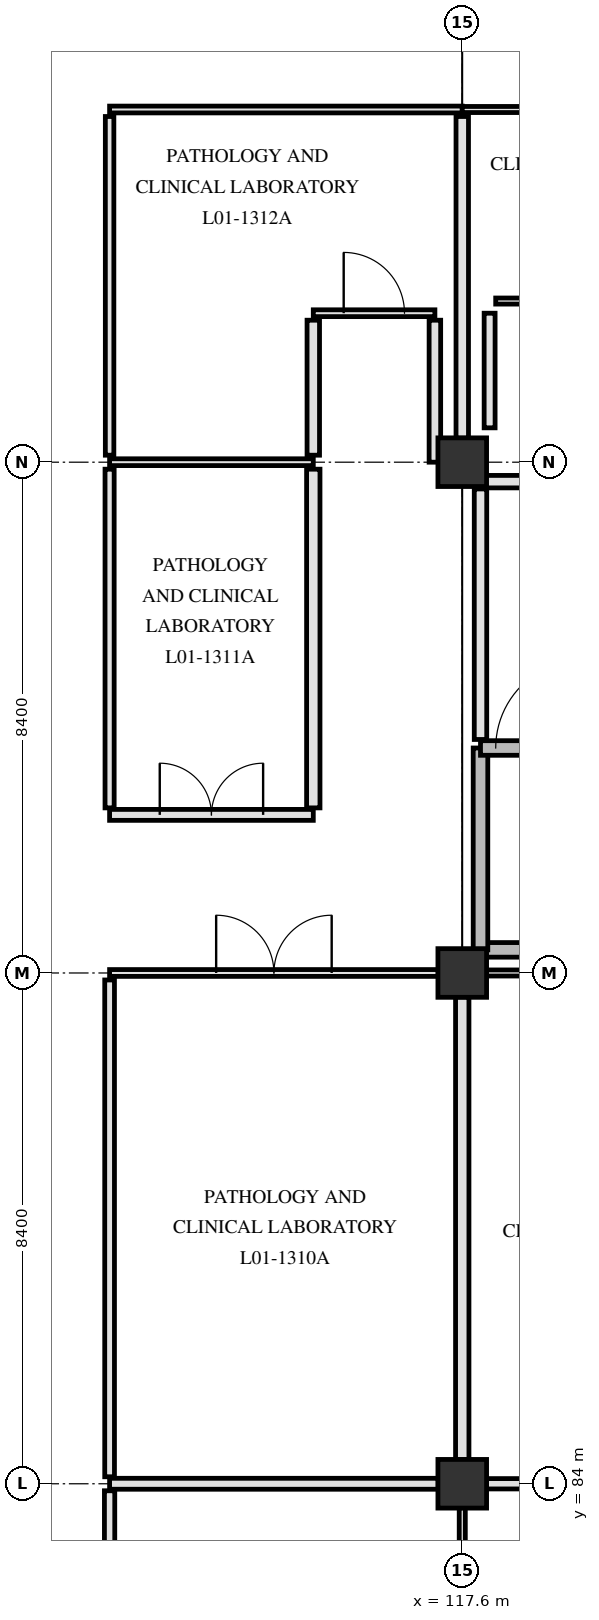
"""IFC4 building model, lengths in metres.
Left out: names, types, materials, properties, quantities, classifications, styles, units other than length and angle.
Written with IfcOpenShell. Run it as: python <this file> out.ifc"""

import sys

from ifc_helpers import new_model, si_unit, direction, frame, frame_2d, origin, origin_2d, place, context, subcontext, project, spatial, rectangle, extrude, element, fill, save


model = new_model("IFC4")
c1 = context("Model", 3, precision=1e-05, world=origin(), true_north=direction((0.0, 1.0)))
c2 = subcontext(c1, "Body", "Model", "MODEL_VIEW")
j1 = project(units=[si_unit("LENGTHUNIT", "METRE"), si_unit("PLANEANGLEUNIT", "RADIAN")], contexts=[c1])
p1 = place(None, origin())
s1 = spatial("IfcSite", under=j1, at=p1, CompositionType="ELEMENT")
p2 = place(p1, origin())
s2 = spatial("IfcBuilding", under=s1, at=p2, CompositionType="ELEMENT")
p3 = place(p2, frame((0.0, 0.0, 4.8)))
s3 = spatial("IfcBuildingStorey", under=s2, at=p3, CompositionType="ELEMENT", Elevation=4.8)
for number, where, z_axis, x_axis in (
    (1, (117.6, 84.0, 0.0), (0.0, 0.0, 1.0), (1.0, 0.0, 0.0)),
    (2, (117.6, 92.4, 0.0), (0.0, 0.0, 1.0), (1.0, 0.0, 0.0)),
    (3, (117.6, 100.8, 0.0), (0.0, 0.0, 1.0), (1.0, 0.0, 0.0)),
):
    element("IfcColumn", number, at=place(p3, frame(where, z_axis=z_axis, x_axis=x_axis)), inside=s3, PredefinedType="COLUMN", context=c2, shape_type="SweptSolid", body=[
        extrude(rectangle(XDim=0.8, YDim=0.8, at=origin_2d()), origin(), (0.0, 0.0, 1.0), 4.5),
    ])
p4 = place(p3, frame((117.9, 92.78, 0.0), z_axis=(0.0, 0.0, 1.0), x_axis=(1.0, 0.0, 0.0)))
e4 = element("IfcWall", 4, at=p4, inside=s3, PredefinedType="SHEAR", context=c2, shape_type="SweptSolid", body=[
    extrude(rectangle(XDim=7.82, YDim=0.24, at=frame_2d((3.91, 0.0))), origin(), (0.0, 0.0, 1.0), 4.15),
])
p5 = place(p3, frame((117.9, 92.78, 0.0), z_axis=(0.0, 0.0, 1.0), x_axis=(0.0, 1.0, 0.0)))
e5 = element("IfcWall", 5, at=p5, inside=s3, PredefinedType="SHEAR", context=c2, shape_type="SweptSolid", body=[
    extrude(rectangle(XDim=3.32, YDim=0.24, at=frame_2d((1.66, 0.0))), origin(), (0.0, 0.0, 1.0), 4.15),
])
p6 = place(p3, frame((117.9, 96.1, 0.0), z_axis=(0.0, 0.0, 1.0), x_axis=(1.0, 0.0, 0.0)))
e6 = element("IfcWall", 6, at=p6, inside=s3, PredefinedType="SHEAR", context=c2, shape_type="SweptSolid", body=[
    extrude(rectangle(XDim=7.82, YDim=0.24, at=frame_2d((3.91, 0.0))), origin(), (0.0, 0.0, 1.0), 4.15),
])
p7 = place(p6, frame((0.25, 0.0, 0.0)))
e7 = element("IfcOpeningElement", 7, at=p7, cuts=e6, PredefinedType="OPENING", context=c2, shape_type="SweptSolid", body=[
    extrude(rectangle(XDim=1.45, YDim=2.2, at=frame_2d((0.725, 1.1))), frame((0.0, 0.13, 0.0), z_axis=(0.0, -1.0, 0.0), x_axis=(1.0, 0.0, 0.0)), (0.0, 0.0, 1.0), 0.26),
])
p8 = place(p3, frame((117.9, 96.24, 0.0), z_axis=(0.0, 0.0, 1.0), x_axis=(0.0, 1.0, 0.0)))
e8 = element("IfcWall", 8, at=p8, inside=s3, PredefinedType="PARTITIONING", context=c2, shape_type="SweptSolid", body=[
    extrude(rectangle(XDim=4.12, YDim=0.205, at=frame_2d((2.06, 0.0))), origin(), (0.0, 0.0, 1.0), 3.59),
])
p9 = place(p3, frame((117.9, 100.48, 0.0), z_axis=(0.0, 0.0, 1.0), x_axis=(1.0, 0.0, 0.0)))
e9 = element("IfcWall", 9, at=p9, inside=s3, PredefinedType="PARTITIONING", context=c2, shape_type="SweptSolid", body=[
    extrude(rectangle(XDim=4.18, YDim=0.205, at=frame_2d((2.09, 0.0))), origin(), (0.0, 0.0, 1.0), 3.54),
])
p10 = place(p9, frame((1.29, 0.0, 0.0)))
e10 = element("IfcOpeningElement", 10, at=p10, cuts=e9, PredefinedType="OPENING", context=c2, shape_type="SweptSolid", body=[
    extrude(rectangle(XDim=1.6, YDim=2.25, at=frame_2d((0.8, 1.125))), frame((0.0, 0.113, 0.0), z_axis=(0.0, -1.0, 0.0), x_axis=(1.0, 0.0, 0.0)), (0.0, 0.0, 1.0), 0.225),
])
p11 = place(p3, frame((111.8, 84.0, 0.0), z_axis=(0.0, 0.0, 1.0), x_axis=(1.0, 0.0, 0.0)))
e11 = element("IfcWall", 11, at=p11, inside=s3, PredefinedType="PARTITIONING", context=c2, shape_type="SweptSolid", body=[
    extrude(rectangle(XDim=5.405, YDim=0.18, at=frame_2d((2.703, 0.0))), origin(), (0.0, 0.0, 1.0), 3.54),
])
p12 = place(p3, frame((117.995, 84.0, 0.0), z_axis=(0.0, 0.0, 1.0), x_axis=(1.0, 0.0, 0.0)))
e12 = element("IfcWall", 12, at=p12, inside=s3, PredefinedType="PARTITIONING", context=c2, shape_type="SweptSolid", body=[
    extrude(rectangle(XDim=5.555, YDim=0.17, at=frame_2d((2.777, 0.0))), origin(), (0.0, 0.0, 1.0), 3.54),
])
p13 = place(p3, frame((111.8, 92.4, 0.0), z_axis=(0.0, 0.0, 1.0), x_axis=(1.0, 0.0, 0.0)))
e13 = element("IfcWall", 13, at=p13, inside=s3, PredefinedType="PARTITIONING", context=c2, shape_type="SweptSolid", body=[
    extrude(rectangle(XDim=5.405, YDim=0.112, at=frame_2d((2.703, 0.0))), origin(), (0.0, 0.0, 1.0), 3.54),
])
p14 = place(p13, frame((1.752, 0.0, 0.0)))
e14 = element("IfcOpeningElement", 14, at=p14, cuts=e13, PredefinedType="OPENING", context=c2, shape_type="SweptSolid", body=[
    extrude(rectangle(XDim=1.9, YDim=2.3, at=frame_2d((0.95, 1.15))), frame((0.0, 0.066, 0.0), z_axis=(0.0, -1.0, 0.0), x_axis=(1.0, 0.0, 0.0)), (0.0, 0.0, 1.0), 0.132),
])
p15 = place(p3, frame((117.995, 92.4, 0.0), z_axis=(0.0, 0.0, 1.0), x_axis=(1.0, 0.0, 0.0)))
e15 = element("IfcWall", 15, at=p15, inside=s3, PredefinedType="PARTITIONING", context=c2, shape_type="SweptSolid", body=[
    extrude(rectangle(XDim=7.61, YDim=0.1, at=frame_2d((3.805, 0.0))), origin(), (0.0, 0.0, 1.0), 3.54),
])
p16 = place(p3, frame((111.8, 95.0, 0.0), z_axis=(0.0, 0.0, 1.0), x_axis=(1.0, 0.0, 0.0)))
e16 = element("IfcWall", 16, at=p16, inside=s3, PredefinedType="PARTITIONING", context=c2, shape_type="SweptSolid", body=[
    extrude(rectangle(XDim=3.35, YDim=0.18, at=frame_2d((1.675, 0.0))), origin(), (0.0, 0.0, 1.0), 4.14),
])
p17 = place(p16, frame((0.825, 0.0, 0.0)))
e17 = element("IfcOpeningElement", 17, at=p17, cuts=e16, PredefinedType="OPENING", context=c2, shape_type="SweptSolid", body=[
    extrude(rectangle(XDim=1.7, YDim=2.25, at=frame_2d((0.85, 1.125))), frame((0.0, 0.1, 0.0), z_axis=(0.0, -1.0, 0.0), x_axis=(1.0, 0.0, 0.0)), (0.0, 0.0, 1.0), 0.2),
])
p18 = place(p3, frame((111.8, 100.8, 0.0), z_axis=(0.0, 0.0, 1.0), x_axis=(1.0, 0.0, 0.0)))
e18 = element("IfcWall", 18, at=p18, inside=s3, PredefinedType="PARTITIONING", context=c2, shape_type="SweptSolid", body=[
    extrude(rectangle(XDim=3.35, YDim=0.112, at=frame_2d((1.675, 0.0))), origin(), (0.0, 0.0, 1.0), 3.54),
])
p19 = place(p3, frame((115.15, 103.25, 0.0), z_axis=(0.0, 0.0, 1.0), x_axis=(1.0, 0.0, 0.0)))
e19 = element("IfcWall", 19, at=p19, inside=s3, PredefinedType="PARTITIONING", context=c2, shape_type="SweptSolid", body=[
    extrude(rectangle(XDim=2.0, YDim=0.112, at=frame_2d((1.0, 0.0))), origin(), (0.0, 0.0, 1.0), 4.14),
])
p20 = place(p19, frame((0.5, 0.0, 0.0)))
e20 = element("IfcOpeningElement", 20, at=p20, cuts=e19, PredefinedType="OPENING", context=c2, shape_type="SweptSolid", body=[
    extrude(rectangle(XDim=1.0, YDim=2.15, at=frame_2d((0.5, 1.075))), frame((0.0, 0.066, 0.0), z_axis=(0.0, -1.0, 0.0), x_axis=(1.0, 0.0, 0.0)), (0.0, 0.0, 1.0), 0.132),
])
p21 = place(p3, frame((118.15, 103.45, 0.0), z_axis=(0.0, 0.0, 1.0), x_axis=(1.0, 0.0, 0.0)))
e21 = element("IfcWall", 21, at=p21, inside=s3, PredefinedType="PARTITIONING", context=c2, shape_type="SweptSolid", body=[
    extrude(rectangle(XDim=7.85, YDim=0.1, at=frame_2d((3.925, 0.0))), origin(), (0.0, 0.0, 1.0), 3.59),
])
p22 = place(p21, frame((3.265, 0.0, 0.0)))
e22 = element("IfcOpeningElement", 22, at=p22, cuts=e21, PredefinedType="OPENING", context=c2, shape_type="SweptSolid", body=[
    extrude(rectangle(XDim=1.32, YDim=2.18, at=frame_2d((0.66, 1.09))), frame((0.0, 0.06, 0.0), z_axis=(0.0, -1.0, 0.0), x_axis=(1.0, 0.0, 0.0)), (0.0, 0.0, 1.0), 0.12),
])
p23 = place(p3, frame((111.8, 106.6, 0.0), z_axis=(0.0, 0.0, 1.0), x_axis=(1.0, 0.0, 0.0)))
e23 = element("IfcWall", 23, at=p23, inside=s3, PredefinedType="PARTITIONING", context=c2, shape_type="SweptSolid", body=[
    extrude(rectangle(XDim=5.8, YDim=0.112, at=frame_2d((2.9, 0.0))), origin(), (0.0, 0.0, 1.0), 3.59),
])
p24 = place(p3, frame((117.6, 106.6, 0.0), z_axis=(0.0, 0.0, 1.0), x_axis=(1.0, 0.0, 0.0)))
e24 = element("IfcWall", 24, at=p24, inside=s3, PredefinedType="PARTITIONING", context=c2, shape_type="SweptSolid", body=[
    extrude(rectangle(XDim=8.4, YDim=0.1, at=frame_2d((4.2, 0.0))), origin(), (0.0, 0.0, 1.0), 3.59),
])
p25 = place(p3, frame((111.8, 78.315, 0.0), z_axis=(0.0, 0.0, 1.0), x_axis=(0.0, 1.0, 0.0)))
e25 = element("IfcWall", 25, at=p25, inside=s3, PredefinedType="PARTITIONING", context=c2, shape_type="SweptSolid", body=[
    extrude(rectangle(XDim=5.57, YDim=0.17, at=frame_2d((2.785, 0.0))), origin(), (0.0, 0.0, 1.0), 3.54),
])
p26 = place(p3, frame((111.8, 84.115, 0.0), z_axis=(0.0, 0.0, 1.0), x_axis=(0.0, 1.0, 0.0)))
e26 = element("IfcWall", 26, at=p26, inside=s3, PredefinedType="PARTITIONING", context=c2, shape_type="SweptSolid", body=[
    extrude(rectangle(XDim=8.17, YDim=0.16, at=frame_2d((4.085, 0.0))), origin(), (0.0, 0.0, 1.0), 3.54),
])
p27 = place(p3, frame((111.8, 95.115, 0.0), z_axis=(0.0, 0.0, 1.0), x_axis=(0.0, 1.0, 0.0)))
e27 = element("IfcWall", 27, at=p27, inside=s3, PredefinedType="PARTITIONING", context=c2, shape_type="SweptSolid", body=[
    extrude(rectangle(XDim=5.57, YDim=0.15, at=frame_2d((2.785, 0.0))), origin(), (0.0, 0.0, 1.0), 3.54),
])
p28 = place(p3, frame((111.8, 100.915, 0.0), z_axis=(0.0, 0.0, 1.0), x_axis=(0.0, 1.0, 0.0)))
e28 = element("IfcWall", 28, at=p28, inside=s3, PredefinedType="PARTITIONING", context=c2, shape_type="SweptSolid", body=[
    extrude(rectangle(XDim=5.57, YDim=0.14, at=frame_2d((2.785, 0.0))), origin(), (0.0, 0.0, 1.0), 3.54),
])
p29 = place(p3, frame((115.15, 95.115, 0.0), z_axis=(0.0, 0.0, 1.0), x_axis=(0.0, 1.0, 0.0)))
e29 = element("IfcWall", 29, at=p29, inside=s3, PredefinedType="PARTITIONING", context=c2, shape_type="SweptSolid", body=[
    extrude(rectangle(XDim=5.57, YDim=0.22, at=frame_2d((2.785, 0.0))), origin(), (0.0, 0.0, 1.0), 3.54),
])
p30 = place(p3, frame((115.15, 100.915, 0.0), z_axis=(0.0, 0.0, 1.0), x_axis=(0.0, 1.0, 0.0)))
e30 = element("IfcWall", 30, at=p30, inside=s3, PredefinedType="PARTITIONING", context=c2, shape_type="SweptSolid", body=[
    extrude(rectangle(XDim=2.22, YDim=0.205, at=frame_2d((1.11, 0.0))), origin(), (0.0, 0.0, 1.0), 3.54),
])
p31 = place(p3, frame((117.15, 100.8, 0.0), z_axis=(0.0, 0.0, 1.0), x_axis=(0.0, 1.0, 0.0)))
e31 = element("IfcWall", 31, at=p31, inside=s3, PredefinedType="PARTITIONING", context=c2, shape_type="SweptSolid", body=[
    extrude(rectangle(XDim=2.335, YDim=0.19, at=frame_2d((1.167, 0.0))), origin(), (0.0, 0.0, 1.0), 3.54),
])
p32 = place(p3, frame((117.6, 78.315, 0.0), z_axis=(0.0, 0.0, 1.0), x_axis=(0.0, 1.0, 0.0)))
e32 = element("IfcWall", 32, at=p32, inside=s3, PredefinedType="PARTITIONING", context=c2, shape_type="SweptSolid", body=[
    extrude(rectangle(XDim=5.29, YDim=0.1, at=frame_2d((2.645, 0.0))), origin(), (0.0, 0.0, 1.0), 3.59),
])
p33 = place(p3, frame((117.6, 84.395, 0.0), z_axis=(0.0, 0.0, 1.0), x_axis=(0.0, 1.0, 0.0)))
e33 = element("IfcWall", 33, at=p33, inside=s3, PredefinedType="PARTITIONING", context=c2, shape_type="SweptSolid", body=[
    extrude(rectangle(XDim=7.61, YDim=0.22, at=frame_2d((3.805, 0.0))), origin(), (0.0, 0.0, 1.0), 3.59),
])
p34 = place(p3, frame((117.6, 101.195, 0.0), z_axis=(0.0, 0.0, 1.0), x_axis=(0.0, 1.0, 0.0)))
e34 = element("IfcWall", 34, at=p34, inside=s3, PredefinedType="PARTITIONING", context=c2, shape_type="SweptSolid", body=[
    extrude(rectangle(XDim=5.29, YDim=0.205, at=frame_2d((2.645, 0.0))), origin(), (0.0, 0.0, 1.0), 3.59),
])
p35 = place(p3, frame((118.05, 101.365, 0.0), z_axis=(0.0, 0.0, 1.0), x_axis=(0.0, 1.0, 0.0)))
e35 = element("IfcWall", 35, at=p35, inside=s3, PredefinedType="PARTITIONING", context=c2, shape_type="SweptSolid", body=[
    extrude(rectangle(XDim=1.885, YDim=0.18, at=frame_2d((0.942, 0.0))), origin(), (0.0, 0.0, 1.0), 4.14),
])
p36 = place(p7, origin())
e36 = element("IfcDoor", 36, at=p36, inside=s3, OperationType="SINGLE_SWING_RIGHT", PredefinedType="DOOR", context=c2, shape_type="SweptSolid", body=[
    extrude(rectangle(XDim=1.45, YDim=2.2, at=frame_2d((0.725, 1.1))), frame((0.0, 0.025, 0.0), z_axis=(0.0, -1.0, 0.0), x_axis=(1.0, 0.0, 0.0)), (0.0, 0.0, 1.0), 0.05),
])
fill(e7, e36)
p37 = place(p14, origin())
e37 = element("IfcDoor", 37, at=p37, inside=s3, OperationType="DOUBLE_SWING_LEFT", PredefinedType="DOOR", context=c2, shape_type="SweptSolid", body=[
    extrude(rectangle(XDim=1.9, YDim=2.3, at=frame_2d((0.95, 1.15))), frame((0.0, 0.025, 0.0), z_axis=(0.0, -1.0, 0.0), x_axis=(1.0, 0.0, 0.0)), (0.0, 0.0, 1.0), 0.05),
])
fill(e14, e37)
p38 = place(p17, origin())
e38 = element("IfcDoor", 38, at=p38, inside=s3, OperationType="DOUBLE_SWING_RIGHT", PredefinedType="DOOR", context=c2, shape_type="SweptSolid", body=[
    extrude(rectangle(XDim=1.7, YDim=2.25, at=frame_2d((0.85, 1.125))), frame((0.0, 0.025, 0.0), z_axis=(0.0, -1.0, 0.0), x_axis=(1.0, 0.0, 0.0)), (0.0, 0.0, 1.0), 0.05),
])
fill(e17, e38)
p39 = place(p20, origin())
e39 = element("IfcDoor", 39, at=p39, inside=s3, OperationType="SINGLE_SWING_LEFT", PredefinedType="DOOR", context=c2, shape_type="SweptSolid", body=[
    extrude(rectangle(XDim=1.0, YDim=2.15, at=frame_2d((0.5, 1.075))), frame((0.0, 0.025, 0.0), z_axis=(0.0, -1.0, 0.0), x_axis=(1.0, 0.0, 0.0)), (0.0, 0.0, 1.0), 0.05),
])
fill(e20, e39)
save(model, sys.argv[1])
